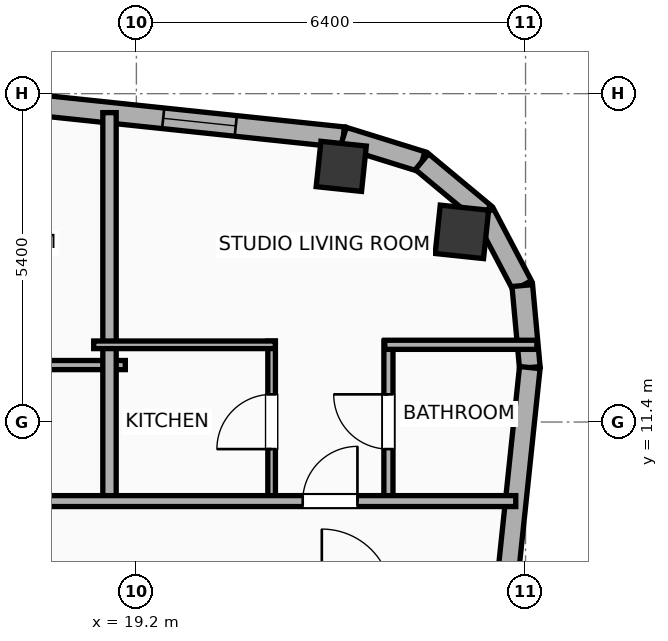
"""IFC4 building model, lengths in metres.
Left out: names, types, materials, properties, quantities, classifications, styles, units other than length and angle.
Written with IfcOpenShell. Run it as: python <this file> out.ifc"""

import sys

from ifc_helpers import new_model, si_unit, direction, frame, frame_2d, origin, origin_2d, place, context, subcontext, project, spatial, rectangle, hollow_rectangle, hollow_circle, extrude, element, fill, save


model = new_model("IFC4")
c1 = context("Model", 3, precision=1e-05, world=origin(), true_north=direction((0.0, 1.0)))
c2 = subcontext(c1, "Body", "Model", "MODEL_VIEW")
j1 = project(units=[si_unit("LENGTHUNIT", "METRE"), si_unit("PLANEANGLEUNIT", "RADIAN")], contexts=[c1])
p1 = place(None, origin())
s1 = spatial("IfcSite", under=j1, at=p1, CompositionType="ELEMENT")
p2 = place(p1, origin())
s2 = spatial("IfcBuilding", under=s1, at=p2, CompositionType="ELEMENT")
p3 = place(p2, frame((0.0, 0.0, 271.7)))
s3 = spatial("IfcBuildingStorey", under=s2, at=p3, CompositionType="ELEMENT", Elevation=271.7)
p4 = place(p3, frame((24.553, 14.527, 0.0), z_axis=(0.0, 0.0, 1.0), x_axis=(0.994521895368, -0.104528463268, 0.0)))
e1 = element("IfcColumn", 1, at=p4, inside=s3, PredefinedType="COLUMN", context=c2, shape_type="SweptSolid", body=[
    extrude(hollow_circle(Radius=0.4, WallThickness=0.028, at=origin_2d()), origin(), (0.0, 0.0, 1.0), 3.9),
])
p5 = place(p3, frame((22.569, 15.604, 0.0), z_axis=(0.0, 0.0, 1.0), x_axis=(0.994521895368, -0.104528463268, 0.0)))
e2 = element("IfcColumn", 2, at=p5, inside=s3, PredefinedType="COLUMN", context=c2, shape_type="SweptSolid", body=[
    extrude(hollow_rectangle(XDim=0.75, YDim=0.75, WallThickness=0.025, at=origin_2d()), origin(), (0.0, 0.0, 1.0), 3.9),
])
p6 = place(p3, frame((-23.908, 20.972, 0.0), z_axis=(0.0, 0.0, 1.0), x_axis=(0.994521888554, -0.104528528102, 0.0)))
e3 = element("IfcWall", 3, at=p6, inside=s3, PredefinedType="ELEMENTEDWALL", context=c2, shape_type="SweptSolid", body=[
    extrude(rectangle(XDim=46.766, YDim=0.34, at=frame_2d((23.383, 0.0))), origin(), (0.0, 0.0, 1.0), 3.65),
])
p7 = place(p6, frame((5.744, 0.0, 0.75)))
e4 = element("IfcOpeningElement", 4, at=p7, cuts=e3, PredefinedType="OPENING", context=c2, shape_type="SweptSolid", body=[
    extrude(rectangle(XDim=2.4, YDim=2.1, at=frame_2d((1.2, 1.05))), frame((0.0, 0.18, 0.0), z_axis=(0.0, -1.0, 0.0), x_axis=(1.0, 0.0, 0.0)), (0.0, 0.0, 1.0), 0.36),
])
p8 = place(p6, frame((3.05, 0.0, 0.75)))
e5 = element("IfcOpeningElement", 5, at=p8, cuts=e3, PredefinedType="OPENING", context=c2, shape_type="SweptSolid", body=[
    extrude(rectangle(XDim=1.2, YDim=2.05, at=frame_2d((0.6, 1.025))), frame((0.0, 0.18, 0.0), z_axis=(0.0, -1.0, 0.0), x_axis=(1.0, 0.0, 0.0)), (0.0, 0.0, 1.0), 0.36),
])
p9 = place(p6, frame((9.957, 0.0, 0.75)))
e6 = element("IfcOpeningElement", 6, at=p9, cuts=e3, PredefinedType="OPENING", context=c2, shape_type="SweptSolid", body=[
    extrude(rectangle(XDim=1.2, YDim=2.05, at=frame_2d((0.6, 1.025))), frame((0.0, 0.18, 0.0), z_axis=(0.0, -1.0, 0.0), x_axis=(1.0, 0.0, 0.0)), (0.0, 0.0, 1.0), 0.36),
])
p10 = place(p6, frame((13.05, 0.0, 0.75)))
e7 = element("IfcOpeningElement", 7, at=p10, cuts=e3, PredefinedType="OPENING", context=c2, shape_type="SweptSolid", body=[
    extrude(rectangle(XDim=1.2, YDim=2.05, at=frame_2d((0.6, 1.025))), frame((0.0, 0.18, 0.0), z_axis=(0.0, -1.0, 0.0), x_axis=(1.0, 0.0, 0.0)), (0.0, 0.0, 1.0), 0.36),
])
p11 = place(p6, frame((16.383, 0.0, 0.75)))
e8 = element("IfcOpeningElement", 8, at=p11, cuts=e3, PredefinedType="OPENING", context=c2, shape_type="SweptSolid", body=[
    extrude(rectangle(XDim=1.2, YDim=2.05, at=frame_2d((0.6, 1.025))), frame((0.0, 0.18, 0.0), z_axis=(0.0, -1.0, 0.0), x_axis=(1.0, 0.0, 0.0)), (0.0, 0.0, 1.0), 0.36),
])
p12 = place(p6, frame((19.716, 0.0, 0.75)))
e9 = element("IfcOpeningElement", 9, at=p12, cuts=e3, PredefinedType="OPENING", context=c2, shape_type="SweptSolid", body=[
    extrude(rectangle(XDim=1.2, YDim=2.05, at=frame_2d((0.6, 1.025))), frame((0.0, 0.18, 0.0), z_axis=(0.0, -1.0, 0.0), x_axis=(1.0, 0.0, 0.0)), (0.0, 0.0, 1.0), 0.36),
])
p13 = place(p6, frame((23.195, 0.0, 0.75)))
e10 = element("IfcOpeningElement", 10, at=p13, cuts=e3, PredefinedType="OPENING", context=c2, shape_type="SweptSolid", body=[
    extrude(rectangle(XDim=1.2, YDim=2.05, at=frame_2d((0.6, 1.025))), frame((0.0, 0.18, 0.0), z_axis=(0.0, -1.0, 0.0), x_axis=(1.0, 0.0, 0.0)), (0.0, 0.0, 1.0), 0.36),
])
p14 = place(p6, frame((26.194, 0.0, 0.75)))
e11 = element("IfcOpeningElement", 11, at=p14, cuts=e3, PredefinedType="OPENING", context=c2, shape_type="SweptSolid", body=[
    extrude(rectangle(XDim=1.2, YDim=2.05, at=frame_2d((0.6, 1.025))), frame((0.0, 0.18, 0.0), z_axis=(0.0, -1.0, 0.0), x_axis=(1.0, 0.0, 0.0)), (0.0, 0.0, 1.0), 0.36),
])
p15 = place(p6, frame((30.152, 0.0, 0.75)))
e12 = element("IfcOpeningElement", 12, at=p15, cuts=e3, PredefinedType="OPENING", context=c2, shape_type="SweptSolid", body=[
    extrude(rectangle(XDim=1.2, YDim=2.05, at=frame_2d((0.6, 1.025))), frame((0.0, 0.18, 0.0), z_axis=(0.0, -1.0, 0.0), x_axis=(1.0, 0.0, 0.0)), (0.0, 0.0, 1.0), 0.36),
])
p16 = place(p6, frame((33.631, 0.0, 0.75)))
e13 = element("IfcOpeningElement", 13, at=p16, cuts=e3, PredefinedType="OPENING", context=c2, shape_type="SweptSolid", body=[
    extrude(rectangle(XDim=1.2, YDim=2.05, at=frame_2d((0.6, 1.025))), frame((0.0, 0.18, 0.0), z_axis=(0.0, -1.0, 0.0), x_axis=(1.0, 0.0, 0.0)), (0.0, 0.0, 1.0), 0.36),
])
p17 = place(p6, frame((38.07, 0.0, 0.75)))
e14 = element("IfcOpeningElement", 14, at=p17, cuts=e3, PredefinedType="OPENING", context=c2, shape_type="SweptSolid", body=[
    extrude(rectangle(XDim=1.2, YDim=2.05, at=frame_2d((0.6, 1.025))), frame((0.0, 0.18, 0.0), z_axis=(0.0, -1.0, 0.0), x_axis=(1.0, 0.0, 0.0)), (0.0, 0.0, 1.0), 0.36),
])
p18 = place(p6, frame((40.589, 0.0, 0.75)))
e15 = element("IfcOpeningElement", 15, at=p18, cuts=e3, PredefinedType="OPENING", context=c2, shape_type="SweptSolid", body=[
    extrude(rectangle(XDim=1.2, YDim=2.05, at=frame_2d((0.6, 1.025))), frame((0.0, 0.18, 0.0), z_axis=(0.0, -1.0, 0.0), x_axis=(1.0, 0.0, 0.0)), (0.0, 0.0, 1.0), 0.36),
])
p19 = place(p6, frame((43.789, 0.0, 0.75)))
e16 = element("IfcOpeningElement", 16, at=p19, cuts=e3, PredefinedType="OPENING", context=c2, shape_type="SweptSolid", body=[
    extrude(rectangle(XDim=1.2, YDim=2.05, at=frame_2d((0.6, 1.025))), frame((0.0, 0.18, 0.0), z_axis=(0.0, -1.0, 0.0), x_axis=(1.0, 0.0, 0.0)), (0.0, 0.0, 1.0), 0.36),
])
p20 = place(p3, frame((22.603, 16.084, 0.0), z_axis=(0.0, 0.0, 1.0), x_axis=(0.955007802701, -0.296580674994, 0.0)))
e17 = element("IfcWall", 17, at=p20, inside=s3, PredefinedType="ELEMENTEDWALL", context=c2, shape_type="SweptSolid", body=[
    extrude(rectangle(XDim=1.354, YDim=0.34, at=frame_2d((0.677, 0.0))), origin(), (0.0, 0.0, 1.0), 3.65),
])
for number, where, z_axis, x_axis in (
    (18, (23.896, 15.682, 0.0), (0.0, 0.0, 1.0), (0.769, -0.64, 0.0)),
    (19, (24.924, 14.827, 0.0), (0.0, 0.0, 1.0), (0.466, -0.885, 0.0)),
):
    element("IfcWall", number, at=place(p3, frame(where, z_axis=z_axis, x_axis=x_axis)), inside=s3, PredefinedType="ELEMENTEDWALL", context=c2, shape_type="SweptSolid", body=[
        extrude(rectangle(XDim=1.337, YDim=0.34, at=frame_2d((0.668, 0.0))), origin(), (0.0, 0.0, 1.0), 3.65),
    ])
p21 = place(p3, frame((25.546, 13.644, 0.0), z_axis=(0.0, 0.0, 1.0), x_axis=(0.091592370975, -0.995796584438, 0.0)))
e20 = element("IfcWall", 20, at=p21, inside=s3, PredefinedType="ELEMENTEDWALL", context=c2, shape_type="SweptSolid", body=[
    extrude(rectangle(XDim=1.354, YDim=0.34, at=frame_2d((0.677, 0.0))), origin(), (0.0, 0.0, 1.0), 3.65),
])
p22 = place(p3, frame((25.67, 12.296, 0.0), z_axis=(0.0, 0.0, 1.0), x_axis=(-0.104533282919, -0.994521388791, 0.0)))
e21 = element("IfcWall", 21, at=p22, inside=s3, PredefinedType="ELEMENTEDWALL", context=c2, shape_type="SweptSolid", body=[
    extrude(rectangle(XDim=30.366, YDim=0.34, at=frame_2d((15.183, 0.0))), origin(), (0.0, 0.0, 1.0), 3.65),
])
p23 = place(p22, frame((5.842, 0.0, 0.75)))
e22 = element("IfcOpeningElement", 22, at=p23, cuts=e21, PredefinedType="OPENING", context=c2, shape_type="SweptSolid", body=[
    extrude(rectangle(XDim=1.8, YDim=2.1, at=frame_2d((0.9, 1.05))), frame((0.0, 0.18, 0.0), z_axis=(0.0, -1.0, 0.0), x_axis=(1.0, 0.0, 0.0)), (0.0, 0.0, 1.0), 0.36),
])
p24 = place(p22, frame((23.525, 0.0, 0.75)))
e23 = element("IfcOpeningElement", 23, at=p24, cuts=e21, PredefinedType="OPENING", context=c2, shape_type="SweptSolid", body=[
    extrude(rectangle(XDim=1.8, YDim=2.1, at=frame_2d((0.9, 1.05))), frame((0.0, 0.18, 0.0), z_axis=(0.0, -1.0, 0.0), x_axis=(1.0, 0.0, 0.0)), (0.0, 0.0, 1.0), 0.36),
])
p25 = place(p22, frame((27.017, 0.0, 0.75)))
e24 = element("IfcOpeningElement", 24, at=p25, cuts=e21, PredefinedType="OPENING", context=c2, shape_type="SweptSolid", body=[
    extrude(rectangle(XDim=1.2, YDim=2.05, at=frame_2d((0.6, 1.025))), frame((0.0, 0.18, 0.0), z_axis=(0.0, -1.0, 0.0), x_axis=(1.0, 0.0, 0.0)), (0.0, 0.0, 1.0), 0.36),
])
p26 = place(p22, frame((17.829, 0.0, 0.75)))
e25 = element("IfcOpeningElement", 25, at=p26, cuts=e21, PredefinedType="OPENING", context=c2, shape_type="SweptSolid", body=[
    extrude(rectangle(XDim=1.2, YDim=2.05, at=frame_2d((0.6, 1.025))), frame((0.0, 0.18, 0.0), z_axis=(0.0, -1.0, 0.0), x_axis=(1.0, 0.0, 0.0)), (0.0, 0.0, 1.0), 0.36),
])
p27 = place(p3, frame((15.228, 12.337, 0.0), z_axis=(0.0, 0.0, 1.0), x_axis=(1.0, 0.0, 0.0)))
e26 = element("IfcWall", 26, at=p27, inside=s3, PredefinedType="PLUMBINGWALL", context=c2, shape_type="SweptSolid", body=[
    extrude(rectangle(XDim=3.79, YDim=0.15, at=frame_2d((1.895, 0.0))), origin(), (0.0, 0.0, 1.0), 3.65),
])
p28 = place(p3, frame((18.758, 10.02, 0.0), z_axis=(0.0, 0.0, 1.0), x_axis=(0.0, 1.0, 0.0)))
e27 = element("IfcWall", 27, at=p28, inside=s3, PredefinedType="PARTITIONING", context=c2, shape_type="SweptSolid", body=[
    extrude(rectangle(XDim=6.468, YDim=0.22, at=frame_2d((3.234, 0.0))), origin(), (0.0, 0.0, 1.0), 3.65),
])
p29 = place(p3, frame((21.424, 10.08, 0.0), z_axis=(0.0, 0.0, 1.0), x_axis=(0.0, 1.0, 0.0)))
e28 = element("IfcWall", 28, at=p29, inside=s3, PredefinedType="PARTITIONING", context=c2, shape_type="SweptSolid", body=[
    extrude(rectangle(XDim=2.65, YDim=0.125, at=frame_2d((1.325, 0.0))), origin(), (0.0, 0.0, 1.0), 3.09),
])
p30 = place(p29, frame((0.875, 0.0, 0.0)))
e29 = element("IfcOpeningElement", 29, at=p30, cuts=e28, PredefinedType="OPENING", context=c2, shape_type="SweptSolid", body=[
    extrude(rectangle(XDim=0.9, YDim=2.05, at=frame_2d((0.45, 1.025))), frame((0.0, 0.073, 0.0), z_axis=(0.0, -1.0, 0.0), x_axis=(1.0, 0.0, 0.0)), (0.0, 0.0, 1.0), 0.145),
])
p31 = place(p3, frame((23.345, 10.08, 0.0), z_axis=(0.0, 0.0, 1.0), x_axis=(0.0, 1.0, 0.0)))
e30 = element("IfcWall", 30, at=p31, inside=s3, PredefinedType="PLUMBINGWALL", context=c2, shape_type="SweptSolid", body=[
    extrude(rectangle(XDim=2.65, YDim=0.15, at=frame_2d((1.325, 0.0))), origin(), (0.0, 0.0, 1.0), 3.65),
])
p32 = place(p31, frame((0.875, 0.0, 0.0)))
e31 = element("IfcOpeningElement", 31, at=p32, cuts=e30, PredefinedType="OPENING", context=c2, shape_type="SweptSolid", body=[
    extrude(rectangle(XDim=0.9, YDim=2.05, at=frame_2d((0.45, 1.025))), frame((0.0, 0.085, 0.0), z_axis=(0.0, -1.0, 0.0), x_axis=(1.0, 0.0, 0.0)), (0.0, 0.0, 1.0), 0.17),
])
p33 = place(p3, frame((18.498, 12.67, 0.0), z_axis=(0.0, 0.0, 1.0), x_axis=(1.0, 0.0, 0.0)))
e32 = element("IfcWall", 32, at=p33, inside=s3, PredefinedType="PARTITIONING", context=c2, shape_type="SweptSolid", body=[
    extrude(rectangle(XDim=2.986, YDim=0.125, at=frame_2d((1.493, 0.0))), origin(), (0.0, 0.0, 1.0), 3.65),
])
p34 = place(p3, frame((23.285, 12.67, 0.0), z_axis=(0.0, 0.0, 1.0), x_axis=(1.0, 0.0, 0.0)))
e33 = element("IfcWall", 33, at=p34, inside=s3, PredefinedType="PLUMBINGWALL", context=c2, shape_type="SweptSolid", body=[
    extrude(rectangle(XDim=2.501, YDim=0.15, at=frame_2d((1.251, 0.0))), origin(), (0.0, 0.0, 1.0), 3.65),
])
p35 = place(p3, frame((-28.516, 10.1, 0.0), z_axis=(0.0, 0.0, 1.0), x_axis=(1.0, 0.0, 0.0)))
e34 = element("IfcWall", 34, at=p35, inside=s3, PredefinedType="PARTITIONING", context=c2, shape_type="SweptSolid", body=[
    extrude(rectangle(XDim=53.955, YDim=0.18, at=frame_2d((26.978, 0.0))), origin(), (0.0, 0.0, 1.0), 3.65),
])
p36 = place(p35, frame((2.998, 0.0, 0.0)))
e35 = element("IfcOpeningElement", 35, at=p36, cuts=e34, PredefinedType="OPENING", context=c2, shape_type="SweptSolid", body=[
    extrude(rectangle(XDim=0.9, YDim=2.05, at=frame_2d((0.45, 1.025))), frame((0.0, 0.1, 0.0), z_axis=(0.0, -1.0, 0.0), x_axis=(1.0, 0.0, 0.0)), (0.0, 0.0, 1.0), 0.2),
])
p37 = place(p35, frame((9.656, 0.0, 0.0)))
e36 = element("IfcOpeningElement", 36, at=p37, cuts=e34, PredefinedType="OPENING", context=c2, shape_type="SweptSolid", body=[
    extrude(rectangle(XDim=0.9, YDim=2.05, at=frame_2d((0.45, 1.025))), frame((0.0, 0.1, 0.0), z_axis=(0.0, -1.0, 0.0), x_axis=(1.0, 0.0, 0.0)), (0.0, 0.0, 1.0), 0.2),
])
p38 = place(p35, frame((16.287, 0.0, 0.0)))
e37 = element("IfcOpeningElement", 37, at=p38, cuts=e34, PredefinedType="OPENING", context=c2, shape_type="SweptSolid", body=[
    extrude(rectangle(XDim=0.9, YDim=2.05, at=frame_2d((0.45, 1.025))), frame((0.0, 0.1, 0.0), z_axis=(0.0, -1.0, 0.0), x_axis=(1.0, 0.0, 0.0)), (0.0, 0.0, 1.0), 0.2),
])
p39 = place(p35, frame((22.918, 0.0, 0.0)))
e38 = element("IfcOpeningElement", 38, at=p39, cuts=e34, PredefinedType="OPENING", context=c2, shape_type="SweptSolid", body=[
    extrude(rectangle(XDim=0.9, YDim=2.05, at=frame_2d((0.45, 1.025))), frame((0.0, 0.1, 0.0), z_axis=(0.0, -1.0, 0.0), x_axis=(1.0, 0.0, 0.0)), (0.0, 0.0, 1.0), 0.2),
])
p40 = place(p35, frame((29.689, 0.0, 0.0)))
e39 = element("IfcOpeningElement", 39, at=p40, cuts=e34, PredefinedType="OPENING", context=c2, shape_type="SweptSolid", body=[
    extrude(rectangle(XDim=0.9, YDim=2.05, at=frame_2d((0.45, 1.025))), frame((0.0, 0.1, 0.0), z_axis=(0.0, -1.0, 0.0), x_axis=(1.0, 0.0, 0.0)), (0.0, 0.0, 1.0), 0.2),
])
p41 = place(p35, frame((36.612, 0.0, 0.0)))
e40 = element("IfcOpeningElement", 40, at=p41, cuts=e34, PredefinedType="OPENING", context=c2, shape_type="SweptSolid", body=[
    extrude(rectangle(XDim=0.9, YDim=2.05, at=frame_2d((0.45, 1.025))), frame((0.0, 0.1, 0.0), z_axis=(0.0, -1.0, 0.0), x_axis=(1.0, 0.0, 0.0)), (0.0, 0.0, 1.0), 0.2),
])
p42 = place(p35, frame((43.529, 0.0, 0.0)))
e41 = element("IfcOpeningElement", 41, at=p42, cuts=e34, PredefinedType="OPENING", context=c2, shape_type="SweptSolid", body=[
    extrude(rectangle(XDim=0.9, YDim=2.05, at=frame_2d((0.45, 1.025))), frame((0.0, 0.1, 0.0), z_axis=(0.0, -1.0, 0.0), x_axis=(1.0, 0.0, 0.0)), (0.0, 0.0, 1.0), 0.2),
])
p43 = place(p35, frame((50.452, 0.0, 0.0)))
e42 = element("IfcOpeningElement", 42, at=p43, cuts=e34, PredefinedType="OPENING", context=c2, shape_type="SweptSolid", body=[
    extrude(rectangle(XDim=0.9, YDim=2.05, at=frame_2d((0.45, 1.025))), frame((0.0, 0.1, 0.0), z_axis=(0.0, -1.0, 0.0), x_axis=(1.0, 0.0, 0.0)), (0.0, 0.0, 1.0), 0.2),
])
p44 = place(p19, origin())
e43 = element("IfcWindow", 43, at=p44, inside=s3, PartitioningType="SINGLE_PANEL", PredefinedType="WINDOW", context=c2, shape_type="SweptSolid", body=[
    extrude(rectangle(XDim=1.2, YDim=2.05, at=frame_2d((0.6, 1.025))), frame((0.0, 0.03, 0.0), z_axis=(0.0, -1.0, 0.0), x_axis=(1.0, 0.0, 0.0)), (0.0, 0.0, 1.0), 0.06),
])
fill(e16, e43)
p45 = place(p30, origin())
e44 = element("IfcDoor", 44, at=p45, inside=s3, OperationType="SINGLE_SWING_LEFT", PredefinedType="DOOR", context=c2, shape_type="SweptSolid", body=[
    extrude(rectangle(XDim=0.9, YDim=2.05, at=frame_2d((0.45, 1.025))), frame((0.0, 0.025, 0.0), z_axis=(0.0, -1.0, 0.0), x_axis=(1.0, 0.0, 0.0)), (0.0, 0.0, 1.0), 0.05),
])
fill(e29, e44)
p46 = place(p32, origin())
e45 = element("IfcDoor", 45, at=p46, inside=s3, OperationType="SINGLE_SWING_RIGHT", PredefinedType="DOOR", context=c2, shape_type="SweptSolid", body=[
    extrude(rectangle(XDim=0.9, YDim=2.05, at=frame_2d((0.45, 1.025))), frame((0.0, 0.025, 0.0), z_axis=(0.0, -1.0, 0.0), x_axis=(1.0, 0.0, 0.0)), (0.0, 0.0, 1.0), 0.05),
])
fill(e31, e45)
p47 = place(p43, origin())
e46 = element("IfcDoor", 46, at=p47, inside=s3, OperationType="SINGLE_SWING_RIGHT", PredefinedType="DOOR", context=c2, shape_type="SweptSolid", body=[
    extrude(rectangle(XDim=0.9, YDim=2.05, at=frame_2d((0.45, 1.025))), frame((0.0, 0.025, 0.0), z_axis=(0.0, -1.0, 0.0), x_axis=(1.0, 0.0, 0.0)), (0.0, 0.0, 1.0), 0.05),
])
fill(e42, e46)
save(model, sys.argv[1])
